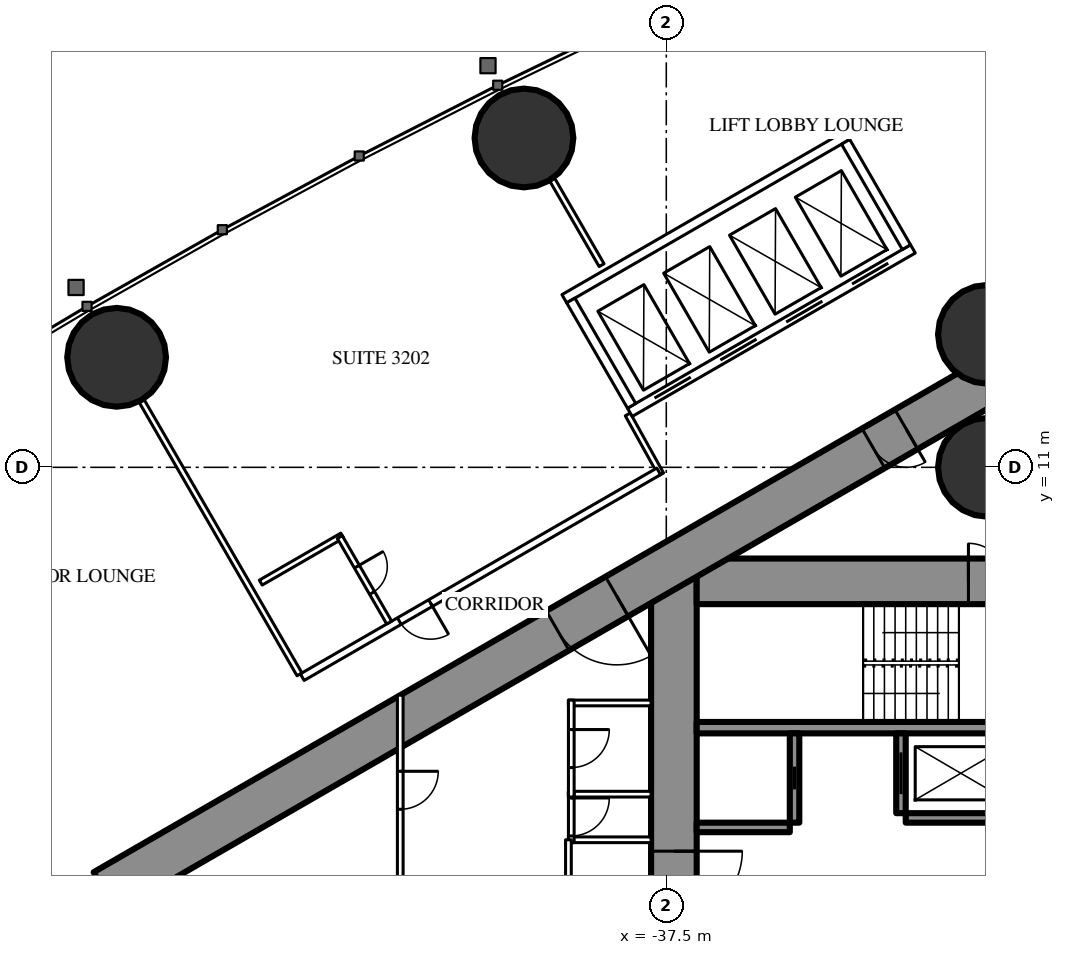
"""IFC4 building model, lengths in metres.
Left out: names, types, materials, properties, quantities, classifications, styles, units other than length and angle.
Written with IfcOpenShell. Run it as: python <this file> out.ifc"""

import sys

from ifc_helpers import new_model, si_unit, direction, frame, frame_2d, origin, origin_2d, place, context, subcontext, project, spatial, rectangle, hollow_circle, extrude, element, fill, save


model = new_model("IFC4")
c1 = context("Model", 3, precision=1e-05, world=origin(), true_north=direction((0.0, 1.0)))
c2 = subcontext(c1, "Body", "Model", "MODEL_VIEW")
j1 = project(units=[si_unit("LENGTHUNIT", "METRE"), si_unit("PLANEANGLEUNIT", "RADIAN")], contexts=[c1])
p1 = place(None, origin())
s1 = spatial("IfcSite", under=j1, at=p1, CompositionType="ELEMENT")
p2 = place(p1, origin())
s2 = spatial("IfcBuilding", under=s1, at=p2, CompositionType="ELEMENT")
p3 = place(p2, frame((0.0, 0.0, 122.1)))
s3 = spatial("IfcBuildingStorey", under=s2, at=p3, CompositionType="ELEMENT", Elevation=122.1)
for number, where, z_axis, x_axis in (
    (1, (-29.05, 11.0, 0.0), (0.0, 0.0, 1.0), (1.0, 0.0, 0.0)),
    (2, (-29.05, 14.5, 0.0), (0.0, 0.0, 1.0), (1.0, 0.0, 0.0)),
    (3, (-41.245, 19.666, 0.0), (0.0, 0.0, 1.0), (1.0, 0.0, 0.0)),
    (4, (-51.963, 13.895, 0.0), (0.0, 0.0, 1.0), (1.0, 0.0, 0.0)),
):
    element("IfcColumn", number, at=place(p3, frame(where, z_axis=z_axis, x_axis=x_axis)), inside=s3, PredefinedType="COLUMN", context=c2, shape_type="SweptSolid", body=[
        extrude(hollow_circle(Radius=1.3, WallThickness=0.1, at=origin_2d()), origin(), (0.0, 0.0, 1.0), 3.5),
    ])
p4 = place(p3, frame((-37.3, 8.6, 0.0), z_axis=(0.0, 0.0, 1.0), x_axis=(0.0, -1.0, 0.0)))
e5 = element("IfcWall", 5, at=p4, inside=s3, PredefinedType="SHEAR", context=c2, shape_type="SweptSolid", body=[
    extrude(rectangle(XDim=17.2, YDim=1.2, at=frame_2d((8.6, 0.0))), origin(), (0.0, 0.0, 1.0), 3.5),
])
p5 = place(p4, frame((7.7, 0.0, 0.0)))
e6 = element("IfcOpeningElement", 6, at=p5, cuts=e5, PredefinedType="OPENING", context=c2, shape_type="SweptSolid", body=[
    extrude(rectangle(XDim=1.8, YDim=2.2, at=frame_2d((0.9, 1.1))), frame((0.0, 0.61, 0.0), z_axis=(0.0, -1.0, 0.0), x_axis=(1.0, 0.0, 0.0)), (0.0, 0.0, 1.0), 1.22),
])
p6 = place(p3, frame((-28.3, 8.0, 0.0), z_axis=(0.0, 0.0, 1.0), x_axis=(-1.0, 0.0, 0.0)))
e7 = element("IfcWall", 7, at=p6, inside=s3, PredefinedType="SHEAR", context=c2, shape_type="SweptSolid", body=[
    extrude(rectangle(XDim=8.4, YDim=1.2, at=frame_2d((4.2, 0.0))), origin(), (0.0, 0.0, 1.0), 3.5),
])
p7 = place(p6, frame((0.25, 0.0, 0.0)))
e8 = element("IfcOpeningElement", 8, at=p7, cuts=e7, PredefinedType="OPENING", context=c2, shape_type="SweptSolid", body=[
    extrude(rectangle(XDim=1.0, YDim=2.2, at=frame_2d((0.5, 1.1))), frame((0.0, 0.61, 0.0), z_axis=(0.0, -1.0, 0.0), x_axis=(1.0, 0.0, 0.0)), (0.0, 0.0, 1.0), 1.22),
])
p8 = place(p3, frame((-28.3, 4.15, 0.0), z_axis=(0.0, 0.0, 1.0), x_axis=(-1.0, 0.0, 0.0)))
e9 = element("IfcWall", 9, at=p8, inside=s3, PredefinedType="SHEAR", context=c2, shape_type="SweptSolid", body=[
    extrude(rectangle(XDim=8.4, YDim=0.3, at=frame_2d((4.2, 0.0))), origin(), (0.0, 0.0, 1.0), 3.5),
])
p9 = place(p3, frame((-31.325, 4.0, 0.0), z_axis=(0.0, 0.0, 1.0), x_axis=(0.0, -1.0, 0.0)))
e10 = element("IfcWall", 10, at=p9, inside=s3, PredefinedType="SHEAR", context=c2, shape_type="SweptSolid", body=[
    extrude(rectangle(XDim=2.1, YDim=0.25, at=frame_2d((1.05, 0.0))), origin(), (0.0, 0.0, 1.0), 3.5),
])
p10 = place(p9, frame((0.5, 0.0, 0.0)))
e11 = element("IfcOpeningElement", 11, at=p10, cuts=e10, PredefinedType="OPENING", context=c2, shape_type="SweptSolid", body=[
    extrude(rectangle(XDim=1.1, YDim=2.2, at=frame_2d((0.55, 1.1))), frame((0.0, 0.135, 0.0), z_axis=(0.0, -1.0, 0.0), x_axis=(1.0, 0.0, 0.0)), (0.0, 0.0, 1.0), 0.27),
])
p11 = place(p3, frame((-34.125, 4.0, 0.0), z_axis=(0.0, 0.0, 1.0), x_axis=(0.0, -1.0, 0.0)))
e12 = element("IfcWall", 12, at=p11, inside=s3, PredefinedType="SHEAR", context=c2, shape_type="SweptSolid", body=[
    extrude(rectangle(XDim=2.35, YDim=0.25, at=frame_2d((1.175, 0.0))), origin(), (0.0, 0.0, 1.0), 3.5),
])
p12 = place(p11, frame((0.875, 0.0, 0.0)))
e13 = element("IfcOpeningElement", 13, at=p12, cuts=e12, PredefinedType="OPENING", context=c2, shape_type="SweptSolid", body=[
    extrude(rectangle(XDim=0.6, YDim=2.0, at=frame_2d((0.3, 1.0))), frame((0.0, 0.135, 0.0), z_axis=(0.0, -1.0, 0.0), x_axis=(1.0, 0.0, 0.0)), (0.0, 0.0, 1.0), 0.27),
])
p13 = place(p3, frame((-28.3, 1.775, 0.0), z_axis=(0.0, 0.0, 1.0), x_axis=(-1.0, 0.0, 0.0)))
e14 = element("IfcWall", 14, at=p13, inside=s3, PredefinedType="SHEAR", context=c2, shape_type="SweptSolid", body=[
    extrude(rectangle(XDim=2.9, YDim=0.25, at=frame_2d((1.45, 0.0))), origin(), (0.0, 0.0, 1.0), 3.5),
])
p14 = place(p3, frame((-34.25, 1.525, 0.0), z_axis=(0.0, 0.0, 1.0), x_axis=(-1.0, 0.0, 0.0)))
e15 = element("IfcWall", 15, at=p14, inside=s3, PredefinedType="SHEAR", context=c2, shape_type="SweptSolid", body=[
    extrude(rectangle(XDim=2.45, YDim=0.25, at=frame_2d((1.225, 0.0))), origin(), (0.0, 0.0, 1.0), 3.5),
])
p15 = place(p3, frame((-27.2, 14.3, 0.0), z_axis=(0.0, 0.0, 1.0), x_axis=(-0.866026593062, -0.499997940104, 0.0)))
e16 = element("IfcWall", 16, at=p15, inside=s3, PredefinedType="SHEAR", context=c2, shape_type="SweptSolid", body=[
    extrude(rectangle(XDim=28.946, YDim=1.2, at=frame_2d((14.473, 0.0))), origin(), (0.0, 0.0, 1.0), 3.5),
])
p16 = place(p15, frame((4.6, 0.0, 0.0)))
e17 = element("IfcOpeningElement", 17, at=p16, cuts=e16, PredefinedType="OPENING", context=c2, shape_type="SweptSolid", body=[
    extrude(rectangle(XDim=1.0, YDim=2.2, at=frame_2d((0.5, 1.1))), frame((0.0, 0.61, 0.0), z_axis=(0.0, -1.0, 0.0), x_axis=(1.0, 0.0, 0.0)), (0.0, 0.0, 1.0), 1.22),
])
p17 = place(p15, frame((13.395, 0.0, 0.0)))
e18 = element("IfcOpeningElement", 18, at=p17, cuts=e16, PredefinedType="OPENING", context=c2, shape_type="SweptSolid", body=[
    extrude(rectangle(XDim=1.8, YDim=2.2, at=frame_2d((0.9, 1.1))), frame((0.0, 0.61, 0.0), z_axis=(0.0, -1.0, 0.0), x_axis=(1.0, 0.0, 0.0)), (0.0, 0.0, 1.0), 1.22),
])
p18 = place(p3, frame((-47.151, 5.552, 0.0), z_axis=(0.0, 0.0, 1.0), x_axis=(-0.500003012045, 0.866023664773, 0.0)))
e19 = element("IfcWall", 19, at=p18, inside=s3, PredefinedType="PARTITIONING", context=c2, shape_type="SweptSolid", body=[
    extrude(rectangle(XDim=8.311, YDim=0.15, at=frame_2d((4.156, 0.0))), origin(), (0.0, 0.0, 1.0), 2.2),
])
p19 = place(p3, frame((-39.202, 16.32, 0.0), z_axis=(0.0, 0.0, 1.0), x_axis=(-0.499947391036, 0.866055775454, 0.0)))
e20 = element("IfcWall", 20, at=p19, inside=s3, PredefinedType="PARTITIONING", context=c2, shape_type="SweptSolid", body=[
    extrude(rectangle(XDim=2.599, YDim=0.15, at=frame_2d((1.3, 0.0))), origin(), (0.0, 0.0, 1.0), 3.25),
])
p20 = place(p3, frame((-38.513, 12.392, 0.0), z_axis=(0.0, 0.0, 1.0), x_axis=(0.485585508183, -0.874189175317, 0.0)))
e21 = element("IfcWall", 21, at=p20, inside=s3, PredefinedType="PARTITIONING", context=c2, shape_type="SweptSolid", body=[
    extrude(rectangle(XDim=1.805, YDim=0.15, at=frame_2d((0.902, 0.0))), origin(), (0.0, 0.0, 1.0), 3.25),
])
p21 = place(p3, frame((-37.7, 10.894, 0.0), z_axis=(0.0, 0.0, 1.0), x_axis=(-0.866027551079, -0.499996280759, 0.0)))
e22 = element("IfcWall", 22, at=p21, inside=s3, PredefinedType="PARTITIONING", context=c2, shape_type="SweptSolid", body=[
    extrude(rectangle(XDim=10.831, YDim=0.2, at=frame_2d((5.415, 0.0))), origin(), (0.0, 0.0, 1.0), 3.25),
])
p22 = place(p21, frame((6.93, 0.0, 0.0)))
e23 = element("IfcOpeningElement", 23, at=p22, cuts=e22, PredefinedType="OPENING", context=c2, shape_type="SweptSolid", body=[
    extrude(rectangle(XDim=0.95, YDim=2.2, at=frame_2d((0.475, 1.1))), frame((0.0, 0.11, 0.0), z_axis=(0.0, -1.0, 0.0), x_axis=(1.0, 0.0, 0.0)), (0.0, 0.0, 1.0), 0.22),
])
p23 = place(p3, frame((-46.026, 9.204, 0.0), z_axis=(0.0, 0.0, 1.0), x_axis=(-0.866006523861, -0.500032699561, 0.0)))
e24 = element("IfcWall", 24, at=p23, inside=s3, PredefinedType="PARTITIONING", context=c2, shape_type="SweptSolid", body=[
    extrude(rectangle(XDim=2.475, YDim=0.15, at=frame_2d((1.237, 0.0))), origin(), (0.0, 0.0, 1.0), 3.25),
])
p24 = place(p3, frame((-44.791, 6.915, 0.0), z_axis=(0.0, 0.0, 1.0), x_axis=(-0.500047596559, 0.865997922154, 0.0)))
e25 = element("IfcWall", 25, at=p24, inside=s3, PredefinedType="PARTITIONING", context=c2, shape_type="SweptSolid", body=[
    extrude(rectangle(XDim=2.6, YDim=0.15, at=frame_2d((1.3, 0.0))), origin(), (0.0, 0.0, 1.0), 3.25),
])
p25 = place(p24, frame((0.9, 0.0, 0.0)))
e26 = element("IfcOpeningElement", 26, at=p25, cuts=e25, PredefinedType="OPENING", context=c2, shape_type="SweptSolid", body=[
    extrude(rectangle(XDim=0.8, YDim=2.2, at=frame_2d((0.4, 1.1))), frame((0.0, 0.085, 0.0), z_axis=(0.0, -1.0, 0.0), x_axis=(1.0, 0.0, 0.0)), (0.0, 0.0, 1.0), 0.17),
])
for number, where, z_axis, x_axis in (
    (27, (-37.9, 1.2, 0.0), (0.0, 0.0, 1.0), (-1.0, 0.0, 0.0)),
    (28, (-37.9, 2.4, 0.0), (0.0, 0.0, 1.0), (-1.0, 0.0, 0.0)),
    (29, (-37.9, 4.8, 0.0), (0.0, 0.0, 1.0), (-1.0, 0.0, 0.0)),
):
    element("IfcWall", number, at=place(p3, frame(where, z_axis=z_axis, x_axis=x_axis)), inside=s3, PredefinedType="PARTITIONING", context=c2, shape_type="SweptSolid", body=[
        extrude(rectangle(XDim=2.175, YDim=0.15, at=frame_2d((1.087, 0.0))), origin(), (0.0, 0.0, 1.0), 3.25),
    ])
p26 = place(p3, frame((-40.0, 2.475, 0.0), z_axis=(0.0, 0.0, 1.0), x_axis=(0.0, -1.0, 0.0)))
e30 = element("IfcWall", 30, at=p26, inside=s3, PredefinedType="PARTITIONING", context=c2, shape_type="SweptSolid", body=[
    extrude(rectangle(XDim=1.35, YDim=0.15, at=frame_2d((0.675, 0.0))), origin(), (0.0, 0.0, 1.0), 3.25),
])
p27 = place(p26, frame((0.175, 0.0, 0.0)))
e31 = element("IfcOpeningElement", 31, at=p27, cuts=e30, PredefinedType="OPENING", context=c2, shape_type="SweptSolid", body=[
    extrude(rectangle(XDim=1.0, YDim=2.2, at=frame_2d((0.5, 1.1))), frame((0.0, 0.085, 0.0), z_axis=(0.0, -1.0, 0.0), x_axis=(1.0, 0.0, 0.0)), (0.0, 0.0, 1.0), 0.17),
])
p28 = place(p3, frame((-40.0, 4.875, 0.0), z_axis=(0.0, 0.0, 1.0), x_axis=(0.0, -1.0, 0.0)))
e32 = element("IfcWall", 32, at=p28, inside=s3, PredefinedType="PARTITIONING", context=c2, shape_type="SweptSolid", body=[
    extrude(rectangle(XDim=2.55, YDim=0.15, at=frame_2d((1.275, 0.0))), origin(), (0.0, 0.0, 1.0), 3.25),
])
p29 = place(p28, frame((0.775, 0.0, 0.0)))
e33 = element("IfcOpeningElement", 33, at=p29, cuts=e32, PredefinedType="OPENING", context=c2, shape_type="SweptSolid", body=[
    extrude(rectangle(XDim=1.0, YDim=2.2, at=frame_2d((0.5, 1.1))), frame((0.0, 0.085, 0.0), z_axis=(0.0, -1.0, 0.0), x_axis=(1.0, 0.0, 0.0)), (0.0, 0.0, 1.0), 0.17),
])
p30 = place(p3, frame((-40.075, 1.2, 0.0), z_axis=(0.0, 0.0, 1.0), x_axis=(0.0, -1.0, 0.0)))
e34 = element("IfcWall", 34, at=p30, inside=s3, PredefinedType="PARTITIONING", context=c2, shape_type="SweptSolid", body=[
    extrude(rectangle(XDim=7.374, YDim=0.15, at=frame_2d((3.687, 0.0))), origin(), (0.0, 0.0, 1.0), 3.25),
])
p31 = place(p30, frame((2.787, 0.0, 0.0)))
e35 = element("IfcOpeningElement", 35, at=p31, cuts=e34, PredefinedType="OPENING", context=c2, shape_type="SweptSolid", body=[
    extrude(rectangle(XDim=1.8, YDim=2.2, at=frame_2d((0.9, 1.1))), frame((0.0, 0.085, 0.0), z_axis=(0.0, -1.0, 0.0), x_axis=(1.0, 0.0, 0.0)), (0.0, 0.0, 1.0), 0.17),
])
p32 = place(p3, frame((-44.5, 5.005, 0.0), z_axis=(0.0, 0.0, 1.0), x_axis=(0.0, -1.0, 0.0)))
e36 = element("IfcWall", 36, at=p32, inside=s3, PredefinedType="PARTITIONING", context=c2, shape_type="SweptSolid", body=[
    extrude(rectangle(XDim=10.009, YDim=0.15, at=frame_2d((5.005, 0.0))), origin(), (0.0, 0.0, 1.0), 2.45),
])
p33 = place(p32, frame((2.002, 0.0, 0.0)))
e37 = element("IfcOpeningElement", 37, at=p33, cuts=e36, PredefinedType="OPENING", context=c2, shape_type="SweptSolid", body=[
    extrude(rectangle(XDim=1.0, YDim=2.2, at=frame_2d((0.5, 1.1))), frame((0.0, 0.085, 0.0), z_axis=(0.0, -1.0, 0.0), x_axis=(1.0, 0.0, 0.0)), (0.0, 0.0, 1.0), 0.17),
])
p34 = place(p32, frame((7.007, 0.0, 0.0)))
e38 = element("IfcOpeningElement", 38, at=p34, cuts=e36, PredefinedType="OPENING", context=c2, shape_type="SweptSolid", body=[
    extrude(rectangle(XDim=1.0, YDim=2.2, at=frame_2d((0.5, 1.1))), frame((0.0, 0.085, 0.0), z_axis=(0.0, -1.0, 0.0), x_axis=(1.0, 0.0, 0.0)), (0.0, 0.0, 1.0), 0.17),
])
p35 = place(p3, frame((-31.01, 16.747, 0.0), z_axis=(0.0, 0.0, 1.0), x_axis=(-0.866028165386, -0.499995216735, 0.0)))
e39 = element("IfcWall", 39, at=p35, inside=s3, PredefinedType="PARTITIONING", context=c2, shape_type="SweptSolid", body=[
    extrude(rectangle(XDim=8.6, YDim=0.25, at=frame_2d((4.3, 0.0))), origin(), (0.0, 0.0, 1.0), 3.25),
])
p36 = place(p35, frame((0.75, 0.0, 0.0)))
e40 = element("IfcOpeningElement", 40, at=p36, cuts=e39, PredefinedType="OPENING", context=c2, shape_type="SweptSolid", body=[
    extrude(rectangle(XDim=1.1, YDim=2.2, at=frame_2d((0.55, 1.1))), frame((0.0, 0.135, 0.0), z_axis=(0.0, -1.0, 0.0), x_axis=(1.0, 0.0, 0.0)), (0.0, 0.0, 1.0), 0.27),
])
p37 = place(p35, frame((2.75, 0.0, 0.0)))
e41 = element("IfcOpeningElement", 41, at=p37, cuts=e39, PredefinedType="OPENING", context=c2, shape_type="SweptSolid", body=[
    extrude(rectangle(XDim=1.1, YDim=2.2, at=frame_2d((0.55, 1.1))), frame((0.0, 0.135, 0.0), z_axis=(0.0, -1.0, 0.0), x_axis=(1.0, 0.0, 0.0)), (0.0, 0.0, 1.0), 0.27),
])
p38 = place(p35, frame((4.75, 0.0, 0.0)))
e42 = element("IfcOpeningElement", 42, at=p38, cuts=e39, PredefinedType="OPENING", context=c2, shape_type="SweptSolid", body=[
    extrude(rectangle(XDim=1.1, YDim=2.2, at=frame_2d((0.55, 1.1))), frame((0.0, 0.135, 0.0), z_axis=(0.0, -1.0, 0.0), x_axis=(1.0, 0.0, 0.0)), (0.0, 0.0, 1.0), 0.27),
])
p39 = place(p35, frame((6.75, 0.0, 0.0)))
e43 = element("IfcOpeningElement", 43, at=p39, cuts=e39, PredefinedType="OPENING", context=c2, shape_type="SweptSolid", body=[
    extrude(rectangle(XDim=1.1, YDim=2.2, at=frame_2d((0.55, 1.1))), frame((0.0, 0.135, 0.0), z_axis=(0.0, -1.0, 0.0), x_axis=(1.0, 0.0, 0.0)), (0.0, 0.0, 1.0), 0.27),
])
p40 = place(p3, frame((-32.736, 19.736, 0.0), z_axis=(0.0, 0.0, 1.0), x_axis=(-0.866028165386, -0.499995216735, 0.0)))
e44 = element("IfcWall", 44, at=p40, inside=s3, PredefinedType="PARTITIONING", context=c2, shape_type="SweptSolid", body=[
    extrude(rectangle(XDim=8.6, YDim=0.25, at=frame_2d((4.3, 0.0))), origin(), (0.0, 0.0, 1.0), 3.25),
])
p41 = place(p3, frame((-31.181, 16.793, 0.0), z_axis=(0.0, 0.0, 1.0), x_axis=(-0.499929347863, 0.866066190972, 0.0)))
e45 = element("IfcWall", 45, at=p41, inside=s3, PredefinedType="PARTITIONING", context=c2, shape_type="SweptSolid", body=[
    extrude(rectangle(XDim=3.201, YDim=0.25, at=frame_2d((1.6, 0.0))), origin(), (0.0, 0.0, 1.0), 3.25),
])
p42 = place(p3, frame((-38.413, 12.618, 0.0), z_axis=(0.0, 0.0, 1.0), x_axis=(-0.499872130319, 0.866099216793, 0.0)))
e46 = element("IfcWall", 46, at=p42, inside=s3, PredefinedType="PARTITIONING", context=c2, shape_type="SweptSolid", body=[
    extrude(rectangle(XDim=3.2, YDim=0.25, at=frame_2d((1.6, 0.0))), origin(), (0.0, 0.0, 1.0), 3.25),
])
p43 = place(p25, origin())
e47 = element("IfcDoor", 47, at=p43, inside=s3, OperationType="SINGLE_SWING_RIGHT", PredefinedType="DOOR", context=c2, shape_type="SweptSolid", body=[
    extrude(rectangle(XDim=0.8, YDim=2.2, at=frame_2d((0.4, 1.1))), frame((0.0, 0.025, 0.0), z_axis=(0.0, -1.0, 0.0), x_axis=(1.0, 0.0, 0.0)), (0.0, 0.0, 1.0), 0.05),
])
fill(e26, e47)
p44 = place(p22, origin())
e48 = element("IfcDoor", 48, at=p44, inside=s3, OperationType="SINGLE_SWING_LEFT", PredefinedType="DOOR", context=c2, shape_type="SweptSolid", body=[
    extrude(rectangle(XDim=0.95, YDim=2.2, at=frame_2d((0.475, 1.1))), frame((0.0, 0.025, 0.0), z_axis=(0.0, -1.0, 0.0), x_axis=(1.0, 0.0, 0.0)), (0.0, 0.0, 1.0), 0.05),
])
fill(e23, e48)
p45 = place(p27, origin())
e49 = element("IfcDoor", 49, at=p45, inside=s3, OperationType="SINGLE_SWING_LEFT", PredefinedType="DOOR", context=c2, shape_type="SweptSolid", body=[
    extrude(rectangle(XDim=1.0, YDim=2.2, at=frame_2d((0.5, 1.1))), frame((0.0, 0.025, 0.0), z_axis=(0.0, -1.0, 0.0), x_axis=(1.0, 0.0, 0.0)), (0.0, 0.0, 1.0), 0.05),
])
fill(e31, e49)
p46 = place(p29, origin())
e50 = element("IfcDoor", 50, at=p46, inside=s3, OperationType="SINGLE_SWING_LEFT", PredefinedType="DOOR", context=c2, shape_type="SweptSolid", body=[
    extrude(rectangle(XDim=1.0, YDim=2.2, at=frame_2d((0.5, 1.1))), frame((0.0, 0.025, 0.0), z_axis=(0.0, -1.0, 0.0), x_axis=(1.0, 0.0, 0.0)), (0.0, 0.0, 1.0), 0.05),
])
fill(e33, e50)
p47 = place(p33, origin())
e51 = element("IfcDoor", 51, at=p47, inside=s3, OperationType="SINGLE_SWING_LEFT", PredefinedType="DOOR", context=c2, shape_type="SweptSolid", body=[
    extrude(rectangle(XDim=1.0, YDim=2.2, at=frame_2d((0.5, 1.1))), frame((0.0, 0.025, 0.0), z_axis=(0.0, -1.0, 0.0), x_axis=(1.0, 0.0, 0.0)), (0.0, 0.0, 1.0), 0.05),
])
fill(e37, e51)
p48 = place(p16, origin())
e52 = element("IfcDoor", 52, at=p48, inside=s3, OperationType="SINGLE_SWING_LEFT", PredefinedType="DOOR", context=c2, shape_type="SweptSolid", body=[
    extrude(rectangle(XDim=1.0, YDim=2.2, at=frame_2d((0.5, 1.1))), frame((0.0, 0.025, 0.0), z_axis=(0.0, -1.0, 0.0), x_axis=(1.0, 0.0, 0.0)), (0.0, 0.0, 1.0), 0.05),
])
fill(e17, e52)
p49 = place(p17, origin())
e53 = element("IfcDoor", 53, at=p49, inside=s3, OperationType="DOUBLE_DOOR_SINGLE_SWING", PredefinedType="DOOR", context=c2, shape_type="SweptSolid", body=[
    extrude(rectangle(XDim=1.8, YDim=2.2, at=frame_2d((0.9, 1.1))), frame((0.0, 0.025, 0.0), z_axis=(0.0, -1.0, 0.0), x_axis=(1.0, 0.0, 0.0)), (0.0, 0.0, 1.0), 0.05),
])
fill(e18, e53)
p50 = place(p5, origin())
e54 = element("IfcDoor", 54, at=p50, inside=s3, OperationType="DOUBLE_DOOR_SINGLE_SWING", PredefinedType="DOOR", context=c2, shape_type="SweptSolid", body=[
    extrude(rectangle(XDim=1.8, YDim=2.2, at=frame_2d((0.9, 1.1))), frame((0.0, 0.025, 0.0), z_axis=(0.0, -1.0, 0.0), x_axis=(1.0, 0.0, 0.0)), (0.0, 0.0, 1.0), 0.05),
])
fill(e6, e54)
p51 = place(p7, origin())
e55 = element("IfcDoor", 55, at=p51, inside=s3, OperationType="SINGLE_SWING_RIGHT", PredefinedType="DOOR", context=c2, shape_type="SweptSolid", body=[
    extrude(rectangle(XDim=1.0, YDim=2.2, at=frame_2d((0.5, 1.1))), frame((0.0, 0.025, 0.0), z_axis=(0.0, -1.0, 0.0), x_axis=(1.0, 0.0, 0.0)), (0.0, 0.0, 1.0), 0.05),
])
fill(e8, e55)
p52 = place(p10, origin())
e56 = element("IfcDoor", 56, at=p52, inside=s3, OperationType="SLIDING_TO_LEFT", PredefinedType="USERDEFINED", context=c2, shape_type="SweptSolid", body=[
    extrude(rectangle(XDim=1.1, YDim=2.2, at=frame_2d((0.55, 1.1))), frame((0.0, 0.025, 0.0), z_axis=(0.0, -1.0, 0.0), x_axis=(1.0, 0.0, 0.0)), (0.0, 0.0, 1.0), 0.05),
])
fill(e11, e56)
p53 = place(p12, origin())
e57 = element("IfcDoor", 57, at=p53, inside=s3, OperationType="SLIDING_TO_LEFT", PredefinedType="DOOR", context=c2, shape_type="SweptSolid", body=[
    extrude(rectangle(XDim=0.6, YDim=2.0, at=frame_2d((0.3, 1.0))), frame((0.0, 0.025, 0.0), z_axis=(0.0, -1.0, 0.0), x_axis=(1.0, 0.0, 0.0)), (0.0, 0.0, 1.0), 0.05),
])
fill(e13, e57)
p54 = place(p36, origin())
e58 = element("IfcDoor", 58, at=p54, inside=s3, OperationType="DOUBLE_DOOR_SLIDING", PredefinedType="USERDEFINED", context=c2, shape_type="SweptSolid", body=[
    extrude(rectangle(XDim=1.1, YDim=2.2, at=frame_2d((0.55, 1.1))), frame((0.0, 0.025, 0.0), z_axis=(0.0, -1.0, 0.0), x_axis=(1.0, 0.0, 0.0)), (0.0, 0.0, 1.0), 0.05),
])
fill(e40, e58)
p55 = place(p37, origin())
e59 = element("IfcDoor", 59, at=p55, inside=s3, OperationType="DOUBLE_DOOR_SLIDING", PredefinedType="USERDEFINED", context=c2, shape_type="SweptSolid", body=[
    extrude(rectangle(XDim=1.1, YDim=2.2, at=frame_2d((0.55, 1.1))), frame((0.0, 0.025, 0.0), z_axis=(0.0, -1.0, 0.0), x_axis=(1.0, 0.0, 0.0)), (0.0, 0.0, 1.0), 0.05),
])
fill(e41, e59)
p56 = place(p38, origin())
e60 = element("IfcDoor", 60, at=p56, inside=s3, OperationType="DOUBLE_DOOR_SLIDING", PredefinedType="USERDEFINED", context=c2, shape_type="SweptSolid", body=[
    extrude(rectangle(XDim=1.1, YDim=2.2, at=frame_2d((0.55, 1.1))), frame((0.0, 0.025, 0.0), z_axis=(0.0, -1.0, 0.0), x_axis=(1.0, 0.0, 0.0)), (0.0, 0.0, 1.0), 0.05),
])
fill(e42, e60)
p57 = place(p39, origin())
e61 = element("IfcDoor", 61, at=p57, inside=s3, OperationType="DOUBLE_DOOR_SLIDING", PredefinedType="USERDEFINED", context=c2, shape_type="SweptSolid", body=[
    extrude(rectangle(XDim=1.1, YDim=2.2, at=frame_2d((0.55, 1.1))), frame((0.0, 0.025, 0.0), z_axis=(0.0, -1.0, 0.0), x_axis=(1.0, 0.0, 0.0)), (0.0, 0.0, 1.0), 0.05),
])
fill(e43, e61)
save(model, sys.argv[1])
